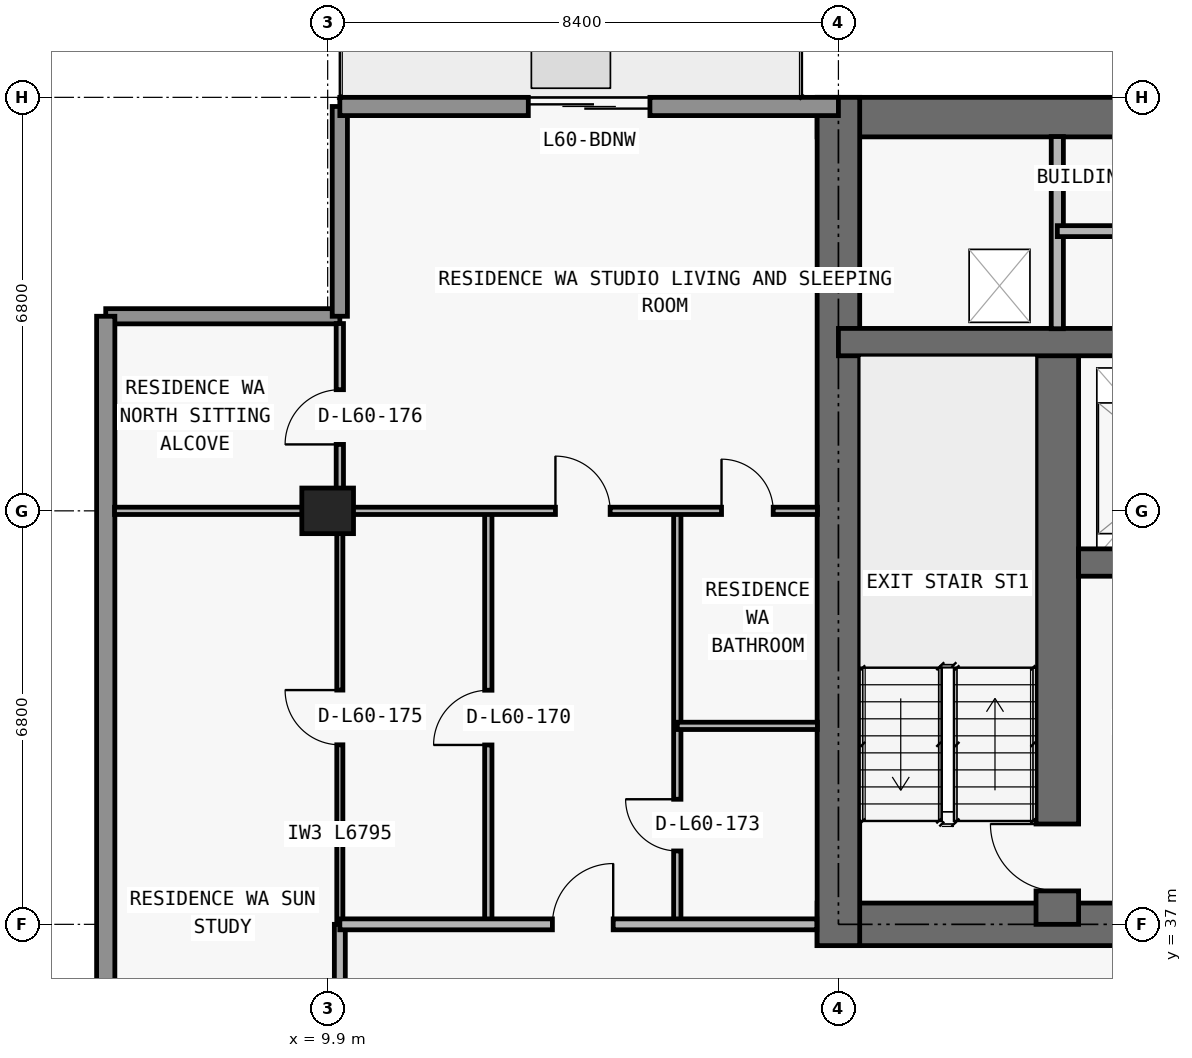
"""IFC4 building model, lengths in metres.
Left out: names, types, materials, properties, quantities, classifications, styles, units other than length and angle.
Written with IfcOpenShell. Run it as: python <this file> out.ifc"""

import sys

from ifc_helpers import new_model, si_unit, direction, frame, frame_2d, origin, origin_2d, place, context, subcontext, project, spatial, rectangle, extrude, element, fill, save


model = new_model("IFC4")
c1 = context("Model", 3, precision=1e-05, world=origin(), true_north=direction((0.0, 1.0)))
c2 = subcontext(c1, "Body", "Model", "MODEL_VIEW")
j1 = project(units=[si_unit("LENGTHUNIT", "METRE"), si_unit("PLANEANGLEUNIT", "RADIAN")], contexts=[c1])
p1 = place(None, origin())
s1 = spatial("IfcSite", under=j1, at=p1, CompositionType="ELEMENT")
p2 = place(p1, origin())
s2 = spatial("IfcBuilding", under=s1, at=p2, CompositionType="ELEMENT")
p3 = place(p2, frame((0.0, 0.0, 214.8)))
s3 = spatial("IfcBuildingStorey", under=s2, at=p3, CompositionType="ELEMENT", Elevation=214.8)
p4 = place(p3, frame((9.9, 43.8, 0.0), z_axis=(0.0, 0.0, 1.0), x_axis=(1.0, 0.0, 0.0)))
e1 = element("IfcColumn", 1, at=p4, inside=s3, PredefinedType="COLUMN", context=c2, shape_type="SweptSolid", body=[
    extrude(rectangle(XDim=0.85, YDim=0.75, at=origin_2d()), origin(), (0.0, 0.0, 1.0), 3.05),
])
p5 = place(p3, frame((17.95, 37.0, 0.0), z_axis=(0.0, 0.0, 1.0), x_axis=(1.0, 0.0, 0.0)))
e2 = element("IfcWall", 2, at=p5, inside=s3, PredefinedType="SHEAR", context=c2, shape_type="SweptSolid", body=[
    extrude(rectangle(XDim=41.9, YDim=0.7, at=frame_2d((20.95, 0.0))), origin(), (0.0, 0.0, 1.0), 3.05),
])
p6 = place(p5, frame((14.35, 0.0, 0.0)))
e3 = element("IfcOpeningElement", 3, at=p6, cuts=e2, PredefinedType="OPENING", context=c2, shape_type="SweptSolid", body=[
    extrude(rectangle(XDim=1.1, YDim=2.15, at=frame_2d((0.55, 1.075))), frame((0.0, 0.36, 0.0), z_axis=(0.0, -1.0, 0.0), x_axis=(1.0, 0.0, 0.0)), (0.0, 0.0, 1.0), 0.72),
])
p7 = place(p5, frame((6.2, 0.0, 0.0)))
e4 = element("IfcOpeningElement", 4, at=p7, cuts=e2, PredefinedType="OPENING", context=c2, shape_type="SweptSolid", body=[
    extrude(rectangle(XDim=1.05, YDim=2.15, at=frame_2d((0.525, 1.075))), frame((0.0, 0.36, 0.0), z_axis=(0.0, -1.0, 0.0), x_axis=(1.0, 0.0, 0.0)), (0.0, 0.0, 1.0), 0.72),
])
p8 = place(p5, frame((34.7, 0.0, 0.0)))
e5 = element("IfcOpeningElement", 5, at=p8, cuts=e2, PredefinedType="OPENING", context=c2, shape_type="SweptSolid", body=[
    extrude(rectangle(XDim=1.05, YDim=2.15, at=frame_2d((0.525, 1.075))), frame((0.0, 0.36, 0.0), z_axis=(0.0, -1.0, 0.0), x_axis=(1.0, 0.0, 0.0)), (0.0, 0.0, 1.0), 0.72),
])
p9 = place(p5, frame((10.812, 0.0, 0.0)))
e6 = element("IfcOpeningElement", 6, at=p9, cuts=e2, PredefinedType="OPENING", context=c2, shape_type="SweptSolid", body=[
    extrude(rectangle(XDim=1.05, YDim=2.15, at=frame_2d((0.525, 1.075))), frame((0.0, 0.36, 0.0), z_axis=(0.0, -1.0, 0.0), x_axis=(1.0, 0.0, 0.0)), (0.0, 0.0, 1.0), 0.72),
])
p10 = place(p5, frame((24.05, 0.0, 0.0)))
e7 = element("IfcOpeningElement", 7, at=p10, cuts=e2, PredefinedType="OPENING", context=c2, shape_type="SweptSolid", body=[
    extrude(rectangle(XDim=1.05, YDim=2.15, at=frame_2d((0.525, 1.075))), frame((0.0, 0.36, 0.0), z_axis=(0.0, -1.0, 0.0), x_axis=(1.0, 0.0, 0.0)), (0.0, 0.0, 1.0), 0.72),
])
p11 = place(p3, frame((17.95, 50.275, 0.0), z_axis=(0.0, 0.0, 1.0), x_axis=(1.0, 0.0, 0.0)))
e8 = element("IfcWall", 8, at=p11, inside=s3, PredefinedType="SHEAR", context=c2, shape_type="SweptSolid", body=[
    extrude(rectangle(XDim=41.9, YDim=0.65, at=frame_2d((20.95, 0.0))), origin(), (0.0, 0.0, 1.0), 3.05),
])
p12 = place(p3, frame((18.3, 36.65, 0.0), z_axis=(0.0, 0.0, 1.0), x_axis=(0.0, 1.0, 0.0)))
e9 = element("IfcWall", 9, at=p12, inside=s3, PredefinedType="SHEAR", context=c2, shape_type="SweptSolid", body=[
    extrude(rectangle(XDim=13.95, YDim=0.7, at=frame_2d((6.975, 0.0))), origin(), (0.0, 0.0, 1.0), 3.05),
])
p13 = place(p3, frame((21.9, 37.0, 0.0), z_axis=(0.0, 0.0, 1.0), x_axis=(0.0, 1.0, 0.0)))
e10 = element("IfcWall", 10, at=p13, inside=s3, PredefinedType="SHEAR", context=c2, shape_type="SweptSolid", body=[
    extrude(rectangle(XDim=9.575, YDim=0.7, at=frame_2d((4.788, 0.0))), origin(), (0.0, 0.0, 1.0), 3.05),
])
p14 = place(p13, frame((0.55, 0.0, 0.0)))
e11 = element("IfcOpeningElement", 11, at=p14, cuts=e10, PredefinedType="OPENING", context=c2, shape_type="SweptSolid", body=[
    extrude(rectangle(XDim=1.1, YDim=2.15, at=frame_2d((0.55, 1.075))), frame((0.0, 0.36, 0.0), z_axis=(0.0, -1.0, 0.0), x_axis=(1.0, 0.0, 0.0)), (0.0, 0.0, 1.0), 0.72),
])
p15 = place(p3, frame((22.25, 42.95, 0.0), z_axis=(0.0, 0.0, 1.0), x_axis=(1.0, 0.0, 0.0)))
e12 = element("IfcWall", 12, at=p15, inside=s3, PredefinedType="SHEAR", context=c2, shape_type="SweptSolid", body=[
    extrude(rectangle(XDim=33.3, YDim=0.45, at=frame_2d((16.65, 0.0))), origin(), (0.0, 0.0, 1.0), 3.05),
])
p16 = place(p15, frame((1.05, 0.0, 0.0)))
e13 = element("IfcOpeningElement", 13, at=p16, cuts=e12, PredefinedType="OPENING", context=c2, shape_type="SweptSolid", body=[
    extrude(rectangle(XDim=1.2, YDim=2.2, at=frame_2d((0.6, 1.1))), frame((0.0, 0.235, 0.0), z_axis=(0.0, -1.0, 0.0), x_axis=(1.0, 0.0, 0.0)), (0.0, 0.0, 1.0), 0.47),
])
p17 = place(p15, frame((31.05, 0.0, 0.0)))
e14 = element("IfcOpeningElement", 14, at=p17, cuts=e12, PredefinedType="OPENING", context=c2, shape_type="SweptSolid", body=[
    extrude(rectangle(XDim=1.2, YDim=2.2, at=frame_2d((0.6, 1.1))), frame((0.0, 0.235, 0.0), z_axis=(0.0, -1.0, 0.0), x_axis=(1.0, 0.0, 0.0)), (0.0, 0.0, 1.0), 0.47),
])
p18 = place(p15, frame((26.45, 0.0, 0.0)))
e15 = element("IfcOpeningElement", 15, at=p18, cuts=e12, PredefinedType="OPENING", context=c2, shape_type="SweptSolid", body=[
    extrude(rectangle(XDim=1.1, YDim=2.2, at=frame_2d((0.55, 1.1))), frame((0.0, 0.235, 0.0), z_axis=(0.0, -1.0, 0.0), x_axis=(1.0, 0.0, 0.0)), (0.0, 0.0, 1.0), 0.47),
])
p19 = place(p15, frame((5.95, 0.0, 0.0)))
e16 = element("IfcOpeningElement", 16, at=p19, cuts=e12, PredefinedType="OPENING", context=c2, shape_type="SweptSolid", body=[
    extrude(rectangle(XDim=1.1, YDim=2.2, at=frame_2d((0.55, 1.1))), frame((0.0, 0.235, 0.0), z_axis=(0.0, -1.0, 0.0), x_axis=(1.0, 0.0, 0.0)), (0.0, 0.0, 1.0), 0.47),
])
p20 = place(p15, frame((3.625, 0.0, 0.0)))
e17 = element("IfcOpeningElement", 17, at=p20, cuts=e12, PredefinedType="OPENING", context=c2, shape_type="SweptSolid", body=[
    extrude(rectangle(XDim=1.05, YDim=2.15, at=frame_2d((0.525, 1.075))), frame((0.0, 0.235, 0.0), z_axis=(0.0, -1.0, 0.0), x_axis=(1.0, 0.0, 0.0)), (0.0, 0.0, 1.0), 0.47),
])
p21 = place(p15, frame((28.675, 0.0, 0.0)))
e18 = element("IfcOpeningElement", 18, at=p21, cuts=e12, PredefinedType="OPENING", context=c2, shape_type="SweptSolid", body=[
    extrude(rectangle(XDim=1.05, YDim=2.15, at=frame_2d((0.525, 1.075))), frame((0.0, 0.235, 0.0), z_axis=(0.0, -1.0, 0.0), x_axis=(1.0, 0.0, 0.0)), (0.0, 0.0, 1.0), 0.47),
])
p22 = place(p15, frame((15.225, 0.0, 0.0)))
e19 = element("IfcOpeningElement", 19, at=p22, cuts=e12, PredefinedType="OPENING", context=c2, shape_type="SweptSolid", body=[
    extrude(rectangle(XDim=1.0, YDim=2.2, at=frame_2d((0.5, 1.1))), frame((0.0, 0.235, 0.0), z_axis=(0.0, -1.0, 0.0), x_axis=(1.0, 0.0, 0.0)), (0.0, 0.0, 1.0), 0.47),
])
p23 = place(p15, frame((21.975, 0.0, 0.0)))
e20 = element("IfcOpeningElement", 20, at=p23, cuts=e12, PredefinedType="OPENING", context=c2, shape_type="SweptSolid", body=[
    extrude(rectangle(XDim=1.0, YDim=2.2, at=frame_2d((0.5, 1.1))), frame((0.0, 0.235, 0.0), z_axis=(0.0, -1.0, 0.0), x_axis=(1.0, 0.0, 0.0)), (0.0, 0.0, 1.0), 0.47),
])
p24 = place(p3, frame((18.3, 46.575, 0.0), z_axis=(0.0, 0.0, 1.0), x_axis=(1.0, 0.0, 0.0)))
e21 = element("IfcWall", 21, at=p24, inside=s3, PredefinedType="SHEAR", context=c2, shape_type="SweptSolid", body=[
    extrude(rectangle(XDim=41.2, YDim=0.45, at=frame_2d((20.6, 0.0))), origin(), (0.0, 0.0, 1.0), 3.05),
])
p25 = place(p24, frame((7.575, 0.0, 0.0)))
e22 = element("IfcOpeningElement", 22, at=p25, cuts=e21, PredefinedType="OPENING", context=c2, shape_type="SweptSolid", body=[
    extrude(rectangle(XDim=1.05, YDim=2.15, at=frame_2d((0.525, 1.075))), frame((0.0, 0.235, 0.0), z_axis=(0.0, -1.0, 0.0), x_axis=(1.0, 0.0, 0.0)), (0.0, 0.0, 1.0), 0.47),
])
p26 = place(p24, frame((32.625, 0.0, 0.0)))
e23 = element("IfcOpeningElement", 23, at=p26, cuts=e21, PredefinedType="OPENING", context=c2, shape_type="SweptSolid", body=[
    extrude(rectangle(XDim=1.05, YDim=2.15, at=frame_2d((0.525, 1.075))), frame((0.0, 0.235, 0.0), z_axis=(0.0, -1.0, 0.0), x_axis=(1.0, 0.0, 0.0)), (0.0, 0.0, 1.0), 0.47),
])
p27 = place(p3, frame((6.25, 47.0, 0.0), z_axis=(0.0, 0.0, 1.0), x_axis=(1.0, 0.0, 0.0)))
e24 = element("IfcWall", 24, at=p27, inside=s3, PredefinedType="ELEMENTEDWALL", context=c2, shape_type="SweptSolid", body=[
    extrude(rectangle(XDim=3.85, YDim=0.25, at=frame_2d((1.925, 0.0))), origin(), (0.0, 0.0, 1.0), 3.05),
])
p28 = place(p3, frame((10.1, 47.0, 0.0), z_axis=(0.0, 0.0, 1.0), x_axis=(0.0, 1.0, 0.0)))
e25 = element("IfcWall", 25, at=p28, inside=s3, PredefinedType="ELEMENTEDWALL", context=c2, shape_type="SweptSolid", body=[
    extrude(rectangle(XDim=3.45, YDim=0.25, at=frame_2d((1.725, 0.0))), origin(), (0.0, 0.0, 1.0), 3.05),
])
p29 = place(p3, frame((6.25, 29.1, 0.0), z_axis=(0.0, 0.0, 1.0), x_axis=(0.0, 1.0, 0.0)))
e26 = element("IfcWall", 26, at=p29, inside=s3, PredefinedType="STANDARD", context=c2, shape_type="SweptSolid", body=[
    extrude(rectangle(XDim=17.9, YDim=0.3, at=frame_2d((8.95, 0.0))), origin(), (0.0, 0.0, 1.0), 3.05),
])
p30 = place(p3, frame((10.1, 50.45, 0.0), z_axis=(0.0, 0.0, 1.0), x_axis=(1.0, 0.0, 0.0)))
e27 = element("IfcWall", 27, at=p30, inside=s3, PredefinedType="STANDARD", context=c2, shape_type="SweptSolid", body=[
    extrude(rectangle(XDim=8.2, YDim=0.3, at=frame_2d((4.1, 0.0))), origin(), (0.0, 0.0, 1.0), 3.05),
])
p31 = place(p30, frame((3.1, 0.0, 0.0)))
e28 = element("IfcOpeningElement", 28, at=p31, cuts=e27, PredefinedType="OPENING", context=c2, shape_type="SweptSolid", body=[
    extrude(rectangle(XDim=2.0, YDim=2.3, at=frame_2d((1.0, 1.15))), frame((0.0, 0.16, 0.0), z_axis=(0.0, -1.0, 0.0), x_axis=(1.0, 0.0, 0.0)), (0.0, 0.0, 1.0), 0.32),
])
p32 = place(p3, frame((10.1, 34.405, 0.0), z_axis=(0.0, 0.0, 1.0), x_axis=(0.0, 1.0, 0.0)))
e29 = element("IfcWall", 29, at=p32, inside=s3, PredefinedType="PARTITIONING", context=c2, shape_type="SweptSolid", body=[
    extrude(rectangle(XDim=2.595, YDim=0.18, at=frame_2d((1.297, 0.0))), origin(), (0.0, 0.0, 1.0), 2.263),
])
p33 = place(p3, frame((10.1, 37.005, 0.0), z_axis=(0.0, 0.0, 1.0), x_axis=(0.0, 1.0, 0.0)))
e30 = element("IfcWall", 30, at=p33, inside=s3, PredefinedType="MOVABLE", context=c2, shape_type="SweptSolid", body=[
    extrude(rectangle(XDim=6.795, YDim=0.1, at=frame_2d((3.397, 0.0))), origin(), (0.0, 0.0, 1.0), 2.263),
])
p34 = place(p33, frame((2.948, 0.0, 0.0)))
e31 = element("IfcOpeningElement", 31, at=p34, cuts=e30, PredefinedType="OPENING", context=c2, shape_type="SweptSolid", body=[
    extrude(rectangle(XDim=0.9, YDim=2.15, at=frame_2d((0.45, 1.075))), frame((0.0, 0.06, 0.0), z_axis=(0.0, -1.0, 0.0), x_axis=(1.0, 0.0, 0.0)), (0.0, 0.0, 1.0), 0.12),
])
p35 = place(p3, frame((10.1, 43.805, 0.0), z_axis=(0.0, 0.0, 1.0), x_axis=(0.0, 1.0, 0.0)))
e32 = element("IfcWall", 32, at=p35, inside=s3, PredefinedType="PARTITIONING", context=c2, shape_type="SweptSolid", body=[
    extrude(rectangle(XDim=3.075, YDim=0.12, at=frame_2d((1.538, 0.0))), origin(), (0.0, 0.0, 1.0), 3.05),
])
p36 = place(p35, frame((1.087, 0.0, 0.0)))
e33 = element("IfcOpeningElement", 33, at=p36, cuts=e32, PredefinedType="OPENING", context=c2, shape_type="SweptSolid", body=[
    extrude(rectangle(XDim=0.9, YDim=2.15, at=frame_2d((0.45, 1.075))), frame((0.0, 0.07, 0.0), z_axis=(0.0, -1.0, 0.0), x_axis=(1.0, 0.0, 0.0)), (0.0, 0.0, 1.0), 0.14),
])
p37 = place(p3, frame((12.542, 37.0, 0.0), z_axis=(0.0, 0.0, 1.0), x_axis=(0.0, 1.0, 0.0)))
e34 = element("IfcWall", 34, at=p37, inside=s3, PredefinedType="PARTITIONING", context=c2, shape_type="SweptSolid", body=[
    extrude(rectangle(XDim=6.8, YDim=0.12, at=frame_2d((3.4, 0.0))), origin(), (0.0, 0.0, 1.0), 2.578),
])
p38 = place(p37, frame((2.95, 0.0, 0.0)))
e35 = element("IfcOpeningElement", 35, at=p38, cuts=e34, PredefinedType="OPENING", context=c2, shape_type="SweptSolid", body=[
    extrude(rectangle(XDim=0.9, YDim=2.15, at=frame_2d((0.45, 1.075))), frame((0.0, 0.07, 0.0), z_axis=(0.0, -1.0, 0.0), x_axis=(1.0, 0.0, 0.0)), (0.0, 0.0, 1.0), 0.14),
])
p39 = place(p3, frame((15.65, 37.0, 0.0), z_axis=(0.0, 0.0, 1.0), x_axis=(0.0, 1.0, 0.0)))
e36 = element("IfcWall", 36, at=p39, inside=s3, PredefinedType="PARTITIONING", context=c2, shape_type="SweptSolid", body=[
    extrude(rectangle(XDim=6.8, YDim=0.12, at=frame_2d((3.4, 0.0))), origin(), (0.0, 0.0, 1.0), 2.679),
])
p40 = place(p39, frame((1.207, 0.0, 0.0)))
e37 = element("IfcOpeningElement", 37, at=p40, cuts=e36, PredefinedType="OPENING", context=c2, shape_type="SweptSolid", body=[
    extrude(rectangle(XDim=0.85, YDim=2.1, at=frame_2d((0.425, 1.05))), frame((0.0, 0.07, 0.0), z_axis=(0.0, -1.0, 0.0), x_axis=(1.0, 0.0, 0.0)), (0.0, 0.0, 1.0), 0.14),
])
p41 = place(p3, frame((21.9, 46.795, 0.0), z_axis=(0.0, 0.0, 1.0), x_axis=(0.0, 1.0, 0.0)))
e38 = element("IfcWall", 38, at=p41, inside=s3, PredefinedType="PARTITIONING", context=c2, shape_type="SweptSolid", body=[
    extrude(rectangle(XDim=3.16, YDim=0.2, at=frame_2d((1.58, 0.0))), origin(), (0.0, 0.0, 1.0), 3.05),
])
p42 = place(p3, frame((10.1, 37.0, 0.0), z_axis=(0.0, 0.0, 1.0), x_axis=(1.0, 0.0, 0.0)))
e39 = element("IfcWall", 39, at=p42, inside=s3, PredefinedType="PARTITIONING", context=c2, shape_type="SweptSolid", body=[
    extrude(rectangle(XDim=7.845, YDim=0.18, at=frame_2d((3.922, 0.0))), origin(), (0.0, 0.0, 1.0), 3.05),
])
p43 = place(p42, frame((3.496, 0.0, 0.0)))
e40 = element("IfcOpeningElement", 40, at=p43, cuts=e39, PredefinedType="OPENING", context=c2, shape_type="SweptSolid", body=[
    extrude(rectangle(XDim=1.0, YDim=2.2, at=frame_2d((0.5, 1.1))), frame((0.0, 0.1, 0.0), z_axis=(0.0, -1.0, 0.0), x_axis=(1.0, 0.0, 0.0)), (0.0, 0.0, 1.0), 0.2),
])
p44 = place(p3, frame((15.65, 40.264, 0.0), z_axis=(0.0, 0.0, 1.0), x_axis=(1.0, 0.0, 0.0)))
e41 = element("IfcWall", 41, at=p44, inside=s3, PredefinedType="PARTITIONING", context=c2, shape_type="SweptSolid", body=[
    extrude(rectangle(XDim=2.305, YDim=0.12, at=frame_2d((1.153, 0.0))), origin(), (0.0, 0.0, 1.0), 3.05),
])
p45 = place(p3, frame((6.395, 43.8, 0.0), z_axis=(0.0, 0.0, 1.0), x_axis=(1.0, 0.0, 0.0)))
e42 = element("IfcWall", 42, at=p45, inside=s3, PredefinedType="PARTITIONING", context=c2, shape_type="SweptSolid", body=[
    extrude(rectangle(XDim=11.56, YDim=0.12, at=frame_2d((5.78, 0.0))), origin(), (0.0, 0.0, 1.0), 2.418),
])
p46 = place(p45, frame((7.251, 0.0, 0.0)))
e43 = element("IfcOpeningElement", 43, at=p46, cuts=e42, PredefinedType="OPENING", context=c2, shape_type="SweptSolid", body=[
    extrude(rectangle(XDim=0.9, YDim=2.15, at=frame_2d((0.45, 1.075))), frame((0.0, 0.07, 0.0), z_axis=(0.0, -1.0, 0.0), x_axis=(1.0, 0.0, 0.0)), (0.0, 0.0, 1.0), 0.14),
])
p47 = place(p45, frame((9.982, 0.0, 0.0)))
e44 = element("IfcOpeningElement", 44, at=p47, cuts=e42, PredefinedType="OPENING", context=c2, shape_type="SweptSolid", body=[
    extrude(rectangle(XDim=0.85, YDim=2.1, at=frame_2d((0.425, 1.05))), frame((0.0, 0.07, 0.0), z_axis=(0.0, -1.0, 0.0), x_axis=(1.0, 0.0, 0.0)), (0.0, 0.0, 1.0), 0.14),
])
p48 = place(p3, frame((21.9, 48.4, 0.0), z_axis=(0.0, 0.0, 1.0), x_axis=(1.0, 0.0, 0.0)))
e45 = element("IfcWall", 45, at=p48, inside=s3, PredefinedType="PARTITIONING", context=c2, shape_type="SweptSolid", body=[
    extrude(rectangle(XDim=17.304, YDim=0.18, at=frame_2d((8.652, 0.0))), origin(), (0.0, 0.0, 1.0), 3.05),
])
p49 = place(p48, frame((8.0, 0.0, 0.0)))
e46 = element("IfcOpeningElement", 46, at=p49, cuts=e45, PredefinedType="OPENING", context=c2, shape_type="SweptSolid", body=[
    extrude(rectangle(XDim=1.0, YDim=2.2, at=frame_2d((0.5, 1.1))), frame((0.0, 0.1, 0.0), z_axis=(0.0, -1.0, 0.0), x_axis=(1.0, 0.0, 0.0)), (0.0, 0.0, 1.0), 0.2),
])
p50 = place(p31, origin())
e47 = element("IfcDoor", 47, at=p50, inside=s3, OperationType="DOUBLE_DOOR_SLIDING", PredefinedType="DOOR", context=c2, shape_type="SweptSolid", body=[
    extrude(rectangle(XDim=2.0, YDim=2.3, at=frame_2d((1.0, 1.15))), frame((0.0, 0.025, 0.0), z_axis=(0.0, -1.0, 0.0), x_axis=(1.0, 0.0, 0.0)), (0.0, 0.0, 1.0), 0.05),
])
fill(e28, e47)
p51 = place(p14, origin())
e48 = element("IfcDoor", 48, at=p51, inside=s3, OperationType="SINGLE_SWING_RIGHT", PredefinedType="DOOR", context=c2, shape_type="SweptSolid", body=[
    extrude(rectangle(XDim=1.1, YDim=2.15, at=frame_2d((0.55, 1.075))), frame((0.0, 0.025, 0.0), z_axis=(0.0, -1.0, 0.0), x_axis=(1.0, 0.0, 0.0)), (0.0, 0.0, 1.0), 0.05),
])
fill(e11, e48)
p52 = place(p38, origin())
e49 = element("IfcDoor", 49, at=p52, inside=s3, OperationType="SINGLE_SWING_LEFT", PredefinedType="DOOR", context=c2, shape_type="SweptSolid", body=[
    extrude(rectangle(XDim=0.9, YDim=2.15, at=frame_2d((0.45, 1.075))), frame((0.0, 0.025, 0.0), z_axis=(0.0, -1.0, 0.0), x_axis=(1.0, 0.0, 0.0)), (0.0, 0.0, 1.0), 0.05),
])
fill(e35, e49)
p53 = place(p43, origin())
e50 = element("IfcDoor", 50, at=p53, inside=s3, OperationType="SINGLE_SWING_RIGHT", PredefinedType="DOOR", context=c2, shape_type="SweptSolid", body=[
    extrude(rectangle(XDim=1.0, YDim=2.2, at=frame_2d((0.5, 1.1))), frame((0.0, 0.025, 0.0), z_axis=(0.0, -1.0, 0.0), x_axis=(1.0, 0.0, 0.0)), (0.0, 0.0, 1.0), 0.05),
])
fill(e40, e50)
p54 = place(p46, origin())
e51 = element("IfcDoor", 51, at=p54, inside=s3, OperationType="SINGLE_SWING_LEFT", PredefinedType="DOOR", context=c2, shape_type="SweptSolid", body=[
    extrude(rectangle(XDim=0.9, YDim=2.15, at=frame_2d((0.45, 1.075))), frame((0.0, 0.025, 0.0), z_axis=(0.0, -1.0, 0.0), x_axis=(1.0, 0.0, 0.0)), (0.0, 0.0, 1.0), 0.05),
])
fill(e43, e51)
p55 = place(p40, origin())
e52 = element("IfcDoor", 52, at=p55, inside=s3, OperationType="SINGLE_SWING_RIGHT", PredefinedType="DOOR", context=c2, shape_type="SweptSolid", body=[
    extrude(rectangle(XDim=0.85, YDim=2.1, at=frame_2d((0.425, 1.05))), frame((0.0, 0.025, 0.0), z_axis=(0.0, -1.0, 0.0), x_axis=(1.0, 0.0, 0.0)), (0.0, 0.0, 1.0), 0.05),
])
fill(e37, e52)
p56 = place(p47, origin())
e53 = element("IfcDoor", 53, at=p56, inside=s3, OperationType="SINGLE_SWING_LEFT", PredefinedType="DOOR", context=c2, shape_type="SweptSolid", body=[
    extrude(rectangle(XDim=0.85, YDim=2.1, at=frame_2d((0.425, 1.05))), frame((0.0, 0.025, 0.0), z_axis=(0.0, -1.0, 0.0), x_axis=(1.0, 0.0, 0.0)), (0.0, 0.0, 1.0), 0.05),
])
fill(e44, e53)
p57 = place(p34, origin())
e54 = element("IfcDoor", 54, at=p57, inside=s3, OperationType="SINGLE_SWING_RIGHT", PredefinedType="DOOR", context=c2, shape_type="SweptSolid", body=[
    extrude(rectangle(XDim=0.9, YDim=2.15, at=frame_2d((0.45, 1.075))), frame((0.0, 0.025, 0.0), z_axis=(0.0, -1.0, 0.0), x_axis=(1.0, 0.0, 0.0)), (0.0, 0.0, 1.0), 0.05),
])
fill(e31, e54)
p58 = place(p36, origin())
e55 = element("IfcDoor", 55, at=p58, inside=s3, OperationType="SINGLE_SWING_LEFT", PredefinedType="DOOR", context=c2, shape_type="SweptSolid", body=[
    extrude(rectangle(XDim=0.9, YDim=2.15, at=frame_2d((0.45, 1.075))), frame((0.0, 0.025, 0.0), z_axis=(0.0, -1.0, 0.0), x_axis=(1.0, 0.0, 0.0)), (0.0, 0.0, 1.0), 0.05),
])
fill(e33, e55)
save(model, sys.argv[1])
